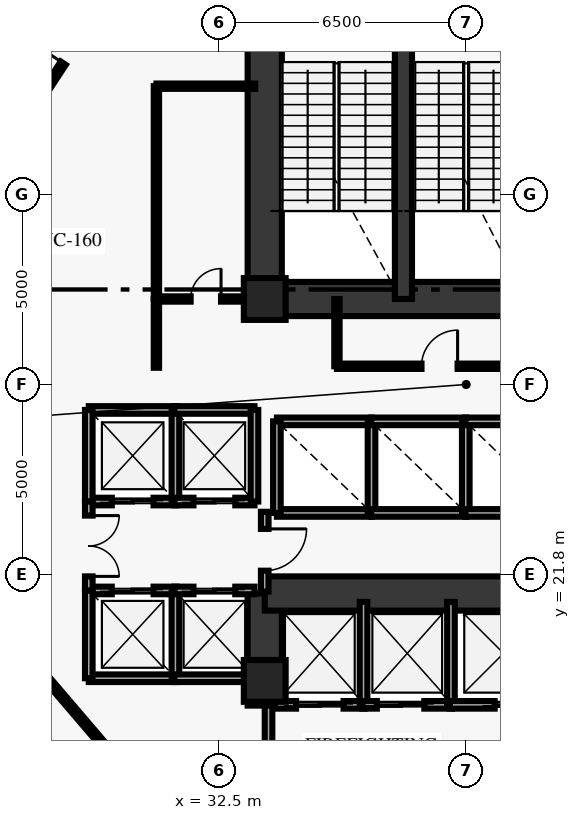
"""IFC4 building model, lengths in metres.
Left out: names, types, materials, properties, quantities, classifications, styles, units other than length and angle.
Written with IfcOpenShell. Run it as: python <this file> out.ifc"""

import sys

from ifc_helpers import new_model, si_unit, direction, frame, frame_2d, origin, origin_2d, place, context, subcontext, project, spatial, rectangle, extrude, element, fill, save


model = new_model("IFC4")
c1 = context("Model", 3, precision=1e-05, world=origin(), true_north=direction((0.0, 1.0)))
c2 = subcontext(c1, "Body", "Model", "MODEL_VIEW")
j1 = project(units=[si_unit("LENGTHUNIT", "METRE"), si_unit("PLANEANGLEUNIT", "RADIAN")], contexts=[c1])
p1 = place(None, origin())
s1 = spatial("IfcSite", under=j1, at=p1, CompositionType="ELEMENT")
p2 = place(p1, origin())
s2 = spatial("IfcBuilding", under=s1, at=p2, CompositionType="ELEMENT")
p3 = place(p2, frame((0.0, 0.0, 16.0)))
s3 = spatial("IfcBuildingStorey", under=s2, at=p3, CompositionType="ELEMENT", Elevation=16.0)
for number, where, z_axis, x_axis in (
    (1, (33.7, 19.0, 0.0), (0.0, 0.0, 1.0), (1.0, 0.0, 0.0)),
    (2, (33.7, 29.05, 0.0), (0.0, 0.0, 1.0), (1.0, 0.0, 0.0)),
):
    element("IfcColumn", number, at=place(p3, frame(where, z_axis=z_axis, x_axis=x_axis)), inside=s3, PredefinedType="PILASTER", context=c2, shape_type="SweptSolid", body=[
        extrude(rectangle(XDim=1.1, YDim=1.1, at=origin_2d()), origin(), (0.0, 0.0, 1.0), 4.74),
    ])
p4 = place(p3, frame((33.7, 29.05, 0.0), z_axis=(0.0, 0.0, 1.0), x_axis=(0.0, 1.0, 0.0)))
e3 = element("IfcWall", 3, at=p4, inside=s3, PredefinedType="SHEAR", context=c2, shape_type="SweptSolid", body=[
    extrude(rectangle(XDim=8.35, YDim=0.9, at=frame_2d((4.175, 0.0))), origin(), (0.0, 0.0, 1.0), 4.74),
])
p5 = place(p3, frame((33.7, 18.35, 0.0), z_axis=(0.0, 0.0, 1.0), x_axis=(0.0, 1.0, 0.0)))
e4 = element("IfcWall", 4, at=p5, inside=s3, PredefinedType="SHEAR", context=c2, shape_type="SweptSolid", body=[
    extrude(rectangle(XDim=2.95, YDim=0.9, at=frame_2d((1.475, 0.0))), origin(), (0.0, 0.0, 1.0), 4.74),
])
p6 = place(p3, frame((33.7, 29.05, 0.0), z_axis=(0.0, 0.0, 1.0), x_axis=(1.0, 0.0, 0.0)))
e5 = element("IfcWall", 5, at=p6, inside=s3, PredefinedType="SHEAR", context=c2, shape_type="SweptSolid", body=[
    extrude(rectangle(XDim=10.6, YDim=0.9, at=frame_2d((5.3, 0.0))), origin(), (0.0, 0.0, 1.0), 4.74),
])
p7 = place(p3, frame((33.7, 21.3, 0.0), z_axis=(0.0, 0.0, 1.0), x_axis=(1.0, 0.0, 0.0)))
e6 = element("IfcWall", 6, at=p7, inside=s3, PredefinedType="SHEAR", context=c2, shape_type="SweptSolid", body=[
    extrude(rectangle(XDim=7.55, YDim=0.9, at=frame_2d((3.775, 0.0))), origin(), (0.0, 0.0, 1.0), 4.74),
])
p8 = place(p3, frame((37.35, 29.05, 0.0), z_axis=(0.0, 0.0, 1.0), x_axis=(0.0, 1.0, 0.0)))
e7 = element("IfcWall", 7, at=p8, inside=s3, PredefinedType="SHEAR", context=c2, shape_type="SweptSolid", body=[
    extrude(rectangle(XDim=8.35, YDim=0.45, at=frame_2d((4.175, 0.0))), origin(), (0.0, 0.0, 1.0), 4.74),
])
p9 = place(p3, frame((35.6, 27.28, 0.0), z_axis=(0.0, 0.0, 1.0), x_axis=(0.0, 1.0, 0.0)))
e8 = element("IfcWall", 8, at=p9, inside=s3, PredefinedType="PARTITIONING", context=c2, shape_type="SweptSolid", body=[
    extrude(rectangle(XDim=1.77, YDim=0.14, at=frame_2d((0.885, 0.0))), origin(), (0.0, 0.0, 1.0), 4.74),
])
p10 = place(p3, frame((29.07, 23.72, 0.0), z_axis=(0.0, 0.0, 1.0), x_axis=(1.0, 0.0, 0.0)))
e9 = element("IfcWall", 9, at=p10, inside=s3, PredefinedType="SOLIDWALL", context=c2, shape_type="SweptSolid", body=[
    extrude(rectangle(XDim=2.31, YDim=0.2, at=frame_2d((1.155, 0.0))), origin(), (0.0, 0.0, 1.0), 4.74),
])
p11 = place(p10, frame((0.605, 0.0, 0.0)))
e10 = element("IfcOpeningElement", 10, at=p11, cuts=e9, PredefinedType="OPENING", context=c2, shape_type="SweptSolid", body=[
    extrude(rectangle(XDim=1.1, YDim=2.15, at=frame_2d((0.55, 1.075))), frame((0.0, 0.11, 0.0), z_axis=(0.0, -1.0, 0.0), x_axis=(1.0, 0.0, 0.0)), (0.0, 0.0, 1.0), 0.22),
])
p12 = place(p3, frame((29.07, 26.13, 0.0), z_axis=(0.0, 0.0, 1.0), x_axis=(1.0, 0.0, 0.0)))
e11 = element("IfcWall", 11, at=p12, inside=s3, PredefinedType="SOLIDWALL", context=c2, shape_type="SweptSolid", body=[
    extrude(rectangle(XDim=2.31, YDim=0.2, at=frame_2d((1.155, 0.0))), origin(), (0.0, 0.0, 1.0), 4.74),
])
for number, where, z_axis, x_axis in (
    (12, (29.07, 23.72, 0.0), (0.0, 0.0, 1.0), (0.0, 1.0, 0.0)),
    (13, (31.35, 23.72, 0.0), (0.0, 0.0, 1.0), (0.0, 1.0, 0.0)),
):
    element("IfcWall", number, at=place(p3, frame(where, z_axis=z_axis, x_axis=x_axis)), inside=s3, PredefinedType="SOLIDWALL", context=c2, shape_type="SweptSolid", body=[
        extrude(rectangle(XDim=2.41, YDim=0.2, at=frame_2d((1.205, 0.0))), origin(), (0.0, 0.0, 1.0), 4.74),
    ])
p13 = place(p3, frame((31.32, 23.72, 0.0), z_axis=(0.0, 0.0, 1.0), x_axis=(1.0, 0.0, 0.0)))
e14 = element("IfcWall", 14, at=p13, inside=s3, PredefinedType="SOLIDWALL", context=c2, shape_type="SweptSolid", body=[
    extrude(rectangle(XDim=2.11, YDim=0.2, at=frame_2d((1.055, 0.0))), origin(), (0.0, 0.0, 1.0), 4.74),
])
p14 = place(p13, frame((0.505, 0.0, 0.0)))
e15 = element("IfcOpeningElement", 15, at=p14, cuts=e14, PredefinedType="OPENING", context=c2, shape_type="SweptSolid", body=[
    extrude(rectangle(XDim=1.1, YDim=2.15, at=frame_2d((0.55, 1.075))), frame((0.0, 0.11, 0.0), z_axis=(0.0, -1.0, 0.0), x_axis=(1.0, 0.0, 0.0)), (0.0, 0.0, 1.0), 0.22),
])
p15 = place(p3, frame((31.32, 26.13, 0.0), z_axis=(0.0, 0.0, 1.0), x_axis=(1.0, 0.0, 0.0)))
e16 = element("IfcWall", 16, at=p15, inside=s3, PredefinedType="SOLIDWALL", context=c2, shape_type="SweptSolid", body=[
    extrude(rectangle(XDim=2.11, YDim=0.2, at=frame_2d((1.055, 0.0))), origin(), (0.0, 0.0, 1.0), 4.74),
])
p16 = place(p3, frame((33.43, 23.72, 0.0), z_axis=(0.0, 0.0, 1.0), x_axis=(0.0, 1.0, 0.0)))
e17 = element("IfcWall", 17, at=p16, inside=s3, PredefinedType="SOLIDWALL", context=c2, shape_type="SweptSolid", body=[
    extrude(rectangle(XDim=2.41, YDim=0.2, at=frame_2d((1.205, 0.0))), origin(), (0.0, 0.0, 1.0), 4.74),
])
p17 = place(p3, frame((29.07, 19.07, 0.0), z_axis=(0.0, 0.0, 1.0), x_axis=(1.0, 0.0, 0.0)))
e18 = element("IfcWall", 18, at=p17, inside=s3, PredefinedType="SOLIDWALL", context=c2, shape_type="SweptSolid", body=[
    extrude(rectangle(XDim=2.31, YDim=0.2, at=frame_2d((1.155, 0.0))), origin(), (0.0, 0.0, 1.0), 4.74),
])
p18 = place(p3, frame((29.07, 21.38, 0.0), z_axis=(0.0, 0.0, 1.0), x_axis=(1.0, 0.0, 0.0)))
e19 = element("IfcWall", 19, at=p18, inside=s3, PredefinedType="SOLIDWALL", context=c2, shape_type="SweptSolid", body=[
    extrude(rectangle(XDim=2.31, YDim=0.2, at=frame_2d((1.155, 0.0))), origin(), (0.0, 0.0, 1.0), 4.74),
])
p19 = place(p18, frame((0.605, 0.0, 0.0)))
e20 = element("IfcOpeningElement", 20, at=p19, cuts=e19, PredefinedType="OPENING", context=c2, shape_type="SweptSolid", body=[
    extrude(rectangle(XDim=1.1, YDim=2.15, at=frame_2d((0.55, 1.075))), frame((0.0, 0.11, 0.0), z_axis=(0.0, -1.0, 0.0), x_axis=(1.0, 0.0, 0.0)), (0.0, 0.0, 1.0), 0.22),
])
for number, where, z_axis, x_axis in (
    (21, (29.07, 19.07, 0.0), (0.0, 0.0, 1.0), (0.0, 1.0, 0.0)),
    (22, (31.35, 19.07, 0.0), (0.0, 0.0, 1.0), (0.0, 1.0, 0.0)),
):
    element("IfcWall", number, at=place(p3, frame(where, z_axis=z_axis, x_axis=x_axis)), inside=s3, PredefinedType="SOLIDWALL", context=c2, shape_type="SweptSolid", body=[
        extrude(rectangle(XDim=2.31, YDim=0.2, at=frame_2d((1.155, 0.0))), origin(), (0.0, 0.0, 1.0), 4.74),
    ])
p20 = place(p3, frame((31.32, 19.07, 0.0), z_axis=(0.0, 0.0, 1.0), x_axis=(1.0, 0.0, 0.0)))
e23 = element("IfcWall", 23, at=p20, inside=s3, PredefinedType="SOLIDWALL", context=c2, shape_type="SweptSolid", body=[
    extrude(rectangle(XDim=2.11, YDim=0.2, at=frame_2d((1.055, 0.0))), origin(), (0.0, 0.0, 1.0), 4.74),
])
p21 = place(p3, frame((31.32, 21.38, 0.0), z_axis=(0.0, 0.0, 1.0), x_axis=(1.0, 0.0, 0.0)))
e24 = element("IfcWall", 24, at=p21, inside=s3, PredefinedType="SOLIDWALL", context=c2, shape_type="SweptSolid", body=[
    extrude(rectangle(XDim=2.11, YDim=0.2, at=frame_2d((1.055, 0.0))), origin(), (0.0, 0.0, 1.0), 4.74),
])
p22 = place(p21, frame((0.505, 0.0, 0.0)))
e25 = element("IfcOpeningElement", 25, at=p22, cuts=e24, PredefinedType="OPENING", context=c2, shape_type="SweptSolid", body=[
    extrude(rectangle(XDim=1.1, YDim=2.15, at=frame_2d((0.55, 1.075))), frame((0.0, 0.11, 0.0), z_axis=(0.0, -1.0, 0.0), x_axis=(1.0, 0.0, 0.0)), (0.0, 0.0, 1.0), 0.22),
])
for number, where, z_axis, x_axis in (
    (26, (34.02, 23.42, 0.0), (0.0, 0.0, 1.0), (1.0, 0.0, 0.0)),
    (27, (34.02, 25.83, 0.0), (0.0, 0.0, 1.0), (1.0, 0.0, 0.0)),
):
    element("IfcWall", number, at=place(p3, frame(where, z_axis=z_axis, x_axis=x_axis)), inside=s3, PredefinedType="SOLIDWALL", context=c2, shape_type="SweptSolid", body=[
        extrude(rectangle(XDim=2.5, YDim=0.2, at=frame_2d((1.25, 0.0))), origin(), (0.0, 0.0, 1.0), 4.74),
    ])
for number, where, z_axis, x_axis in (
    (28, (34.02, 23.42, 0.0), (0.0, 0.0, 1.0), (0.0, 1.0, 0.0)),
    (29, (36.51, 23.42, 0.0), (0.0, 0.0, 1.0), (0.0, 1.0, 0.0)),
):
    element("IfcWall", number, at=place(p3, frame(where, z_axis=z_axis, x_axis=x_axis)), inside=s3, PredefinedType="SOLIDWALL", context=c2, shape_type="SweptSolid", body=[
        extrude(rectangle(XDim=2.41, YDim=0.2, at=frame_2d((1.205, 0.0))), origin(), (0.0, 0.0, 1.0), 4.74),
    ])
for number, where, z_axis, x_axis in (
    (30, (36.5, 23.42, 0.0), (0.0, 0.0, 1.0), (1.0, 0.0, 0.0)),
    (31, (36.5, 25.83, 0.0), (0.0, 0.0, 1.0), (1.0, 0.0, 0.0)),
):
    element("IfcWall", number, at=place(p3, frame(where, z_axis=z_axis, x_axis=x_axis)), inside=s3, PredefinedType="SOLIDWALL", context=c2, shape_type="SweptSolid", body=[
        extrude(rectangle(XDim=2.5, YDim=0.2, at=frame_2d((1.25, 0.0))), origin(), (0.0, 0.0, 1.0), 4.74),
    ])
p23 = place(p3, frame((38.99, 23.42, 0.0), z_axis=(0.0, 0.0, 1.0), x_axis=(0.0, 1.0, 0.0)))
e32 = element("IfcWall", 32, at=p23, inside=s3, PredefinedType="SOLIDWALL", context=c2, shape_type="SweptSolid", body=[
    extrude(rectangle(XDim=2.41, YDim=0.2, at=frame_2d((1.205, 0.0))), origin(), (0.0, 0.0, 1.0), 4.74),
])
for number, where, z_axis, x_axis in (
    (33, (38.98, 23.42, 0.0), (0.0, 0.0, 1.0), (1.0, 0.0, 0.0)),
    (34, (38.98, 25.83, 0.0), (0.0, 0.0, 1.0), (1.0, 0.0, 0.0)),
):
    element("IfcWall", number, at=place(p3, frame(where, z_axis=z_axis, x_axis=x_axis)), inside=s3, PredefinedType="SOLIDWALL", context=c2, shape_type="SweptSolid", body=[
        extrude(rectangle(XDim=2.5, YDim=0.2, at=frame_2d((1.25, 0.0))), origin(), (0.0, 0.0, 1.0), 4.74),
    ])
p24 = place(p3, frame((33.97, 18.37, 0.0), z_axis=(0.0, 0.0, 1.0), x_axis=(1.0, 0.0, 0.0)))
e35 = element("IfcWall", 35, at=p24, inside=s3, PredefinedType="SOLIDWALL", context=c2, shape_type="SweptSolid", body=[
    extrude(rectangle(XDim=2.36, YDim=0.2, at=frame_2d((1.18, 0.0))), origin(), (0.0, 0.0, 1.0), 4.74),
])
p25 = place(p24, frame((0.555, 0.0, 0.0)))
e36 = element("IfcOpeningElement", 36, at=p25, cuts=e35, PredefinedType="OPENING", context=c2, shape_type="SweptSolid", body=[
    extrude(rectangle(XDim=1.25, YDim=2.2, at=frame_2d((0.625, 1.1))), frame((0.0, 0.11, 0.0), z_axis=(0.0, -1.0, 0.0), x_axis=(1.0, 0.0, 0.0)), (0.0, 0.0, 1.0), 0.22),
])
p26 = place(p3, frame((36.3, 18.37, 0.0), z_axis=(0.0, 0.0, 1.0), x_axis=(0.0, 1.0, 0.0)))
e37 = element("IfcWall", 37, at=p26, inside=s3, PredefinedType="SOLIDWALL", context=c2, shape_type="SweptSolid", body=[
    extrude(rectangle(XDim=2.71, YDim=0.2, at=frame_2d((1.355, 0.0))), origin(), (0.0, 0.0, 1.0), 4.74),
])
p27 = place(p3, frame((36.27, 18.37, 0.0), z_axis=(0.0, 0.0, 1.0), x_axis=(1.0, 0.0, 0.0)))
e38 = element("IfcWall", 38, at=p27, inside=s3, PredefinedType="SOLIDWALL", context=c2, shape_type="SweptSolid", body=[
    extrude(rectangle(XDim=2.36, YDim=0.2, at=frame_2d((1.18, 0.0))), origin(), (0.0, 0.0, 1.0), 4.74),
])
p28 = place(p27, frame((0.38, 0.0, 0.0)))
e39 = element("IfcOpeningElement", 39, at=p28, cuts=e38, PredefinedType="OPENING", context=c2, shape_type="SweptSolid", body=[
    extrude(rectangle(XDim=1.25, YDim=2.2, at=frame_2d((0.625, 1.1))), frame((0.0, 0.11, 0.0), z_axis=(0.0, -1.0, 0.0), x_axis=(1.0, 0.0, 0.0)), (0.0, 0.0, 1.0), 0.22),
])
p29 = place(p3, frame((38.6, 18.37, 0.0), z_axis=(0.0, 0.0, 1.0), x_axis=(0.0, 1.0, 0.0)))
e40 = element("IfcWall", 40, at=p29, inside=s3, PredefinedType="SOLIDWALL", context=c2, shape_type="SweptSolid", body=[
    extrude(rectangle(XDim=2.71, YDim=0.2, at=frame_2d((1.355, 0.0))), origin(), (0.0, 0.0, 1.0), 4.74),
])
p30 = place(p3, frame((38.57, 18.37, 0.0), z_axis=(0.0, 0.0, 1.0), x_axis=(1.0, 0.0, 0.0)))
e41 = element("IfcWall", 41, at=p30, inside=s3, PredefinedType="SOLIDWALL", context=c2, shape_type="SweptSolid", body=[
    extrude(rectangle(XDim=2.83, YDim=0.2, at=frame_2d((1.415, 0.0))), origin(), (0.0, 0.0, 1.0), 4.74),
])
p31 = place(p30, frame((1.18, 0.0, 0.0)))
e42 = element("IfcOpeningElement", 42, at=p31, cuts=e41, PredefinedType="OPENING", context=c2, shape_type="SweptSolid", body=[
    extrude(rectangle(XDim=1.35, YDim=2.18, at=frame_2d((0.675, 1.09))), frame((0.0, 0.11, 0.0), z_axis=(0.0, -1.0, 0.0), x_axis=(1.0, 0.0, 0.0)), (0.0, 0.0, 1.0), 0.22),
])
p32 = place(p3, frame((29.07, 21.38, 0.0), z_axis=(0.0, 0.0, 1.0), x_axis=(0.0, 1.0, 0.0)))
e43 = element("IfcWall", 43, at=p32, inside=s3, PredefinedType="SOLIDWALL", context=c2, shape_type="SweptSolid", body=[
    extrude(rectangle(XDim=2.34, YDim=0.2, at=frame_2d((1.17, 0.0))), origin(), (0.0, 0.0, 1.0), 4.74),
])
p33 = place(p32, frame((0.37, 0.0, 0.0)))
e44 = element("IfcOpeningElement", 44, at=p33, cuts=e43, PredefinedType="OPENING", context=c2, shape_type="SweptSolid", body=[
    extrude(rectangle(XDim=1.6, YDim=2.2, at=frame_2d((0.8, 1.1))), frame((0.0, 0.11, 0.0), z_axis=(0.0, -1.0, 0.0), x_axis=(1.0, 0.0, 0.0)), (0.0, 0.0, 1.0), 0.22),
])
p34 = place(p3, frame((33.7, 21.35, 0.0), z_axis=(0.0, 0.0, 1.0), x_axis=(0.0, 1.0, 0.0)))
e45 = element("IfcWall", 45, at=p34, inside=s3, PredefinedType="SOLIDWALL", context=c2, shape_type="SweptSolid", body=[
    extrude(rectangle(XDim=2.1, YDim=0.2, at=frame_2d((1.05, 0.0))), origin(), (0.0, 0.0, 1.0), 3.96),
])
p35 = place(p34, frame((0.55, 0.0, 0.0)))
e46 = element("IfcOpeningElement", 46, at=p35, cuts=e45, PredefinedType="OPENING", context=c2, shape_type="SweptSolid", body=[
    extrude(rectangle(XDim=1.1, YDim=2.15, at=frame_2d((0.55, 1.075))), frame((0.0, 0.11, 0.0), z_axis=(0.0, -1.0, 0.0), x_axis=(1.0, 0.0, 0.0)), (0.0, 0.0, 1.0), 0.22),
])
p36 = place(p3, frame((33.8, 15.55, 0.0), z_axis=(0.0, 0.0, 1.0), x_axis=(0.0, 1.0, 0.0)))
e47 = element("IfcWall", 47, at=p36, inside=s3, PredefinedType="SOLIDWALL", context=c2, shape_type="SweptSolid", body=[
    extrude(rectangle(XDim=2.8, YDim=0.2, at=frame_2d((1.4, 0.0))), origin(), (0.0, 0.0, 1.0), 4.74),
])
p37 = place(p3, frame((35.6, 27.28, 0.0), z_axis=(0.0, 0.0, 1.0), x_axis=(1.0, 0.0, 0.0)))
e48 = element("IfcWall", 48, at=p37, inside=s3, PredefinedType="PARTITIONING", context=c2, shape_type="SweptSolid", body=[
    extrude(rectangle(XDim=5.4, YDim=0.14, at=frame_2d((2.7, 0.0))), origin(), (0.0, 0.0, 1.0), 4.74),
])
p38 = place(p37, frame((2.225, 0.0, 0.0)))
e49 = element("IfcOpeningElement", 49, at=p38, cuts=e48, PredefinedType="OPENING", context=c2, shape_type="SweptSolid", body=[
    extrude(rectangle(XDim=0.95, YDim=2.1, at=frame_2d((0.475, 1.05))), frame((0.0, 0.08, 0.0), z_axis=(0.0, -1.0, 0.0), x_axis=(1.0, 0.0, 0.0)), (0.0, 0.0, 1.0), 0.16),
])
p39 = place(p3, frame((30.85, 27.24, 0.0), z_axis=(0.0, 0.0, 1.0), x_axis=(0.0, 1.0, 0.0)))
e50 = element("IfcWall", 50, at=p39, inside=s3, PredefinedType="PARTITIONING", context=c2, shape_type="SweptSolid", body=[
    extrude(rectangle(XDim=1.81, YDim=0.14, at=frame_2d((0.905, 0.0))), origin(), (0.0, 0.0, 1.0), 4.74),
])
p40 = place(p3, frame((30.85, 29.05, 0.0), z_axis=(0.0, 0.0, 1.0), x_axis=(1.0, 0.0, 0.0)))
e51 = element("IfcWall", 51, at=p40, inside=s3, PredefinedType="PARTITIONING", context=c2, shape_type="SweptSolid", body=[
    extrude(rectangle(XDim=2.6, YDim=0.14, at=frame_2d((1.3, 0.0))), origin(), (0.0, 0.0, 1.0), 2.74),
])
p41 = place(p40, frame((0.9, 0.0, 0.0)))
e52 = element("IfcOpeningElement", 52, at=p41, cuts=e51, PredefinedType="OPENING", context=c2, shape_type="SweptSolid", body=[
    extrude(rectangle(XDim=0.8, YDim=2.05, at=frame_2d((0.4, 1.025))), frame((0.0, 0.08, 0.0), z_axis=(0.0, -1.0, 0.0), x_axis=(1.0, 0.0, 0.0)), (0.0, 0.0, 1.0), 0.16),
])
p42 = place(p3, frame((30.85, 34.65, 0.0), z_axis=(0.0, 0.0, 1.0), x_axis=(1.0, 0.0, 0.0)))
e53 = element("IfcWall", 53, at=p42, inside=s3, PredefinedType="PARTITIONING", context=c2, shape_type="SweptSolid", body=[
    extrude(rectangle(XDim=2.6, YDim=0.14, at=frame_2d((1.3, 0.0))), origin(), (0.0, 0.0, 1.0), 4.74),
])
p43 = place(p3, frame((30.85, 29.05, 0.0), z_axis=(0.0, 0.0, 1.0), x_axis=(0.0, 1.0, 0.0)))
e54 = element("IfcWall", 54, at=p43, inside=s3, PredefinedType="PARTITIONING", context=c2, shape_type="SweptSolid", body=[
    extrude(rectangle(XDim=5.6, YDim=0.14, at=frame_2d((2.8, 0.0))), origin(), (0.0, 0.0, 1.0), 4.74),
])
p44 = place(p3, frame((27.811, 34.36, 0.0), z_axis=(0.0, 0.0, 1.0), x_axis=(0.548348738977, 0.836249759619, 0.0)))
e55 = element("IfcWall", 55, at=p44, inside=s3, PredefinedType="PARTITIONING", context=c2, shape_type="SweptSolid", body=[
    extrude(rectangle(XDim=3.744, YDim=0.16, at=frame_2d((1.872, 0.0))), origin(), (0.0, 0.0, 1.0), 4.74),
])
p45 = place(p44, frame((1.072, 0.0, 0.0)))
e56 = element("IfcOpeningElement", 56, at=p45, cuts=e55, PredefinedType="OPENING", context=c2, shape_type="SweptSolid", body=[
    extrude(rectangle(XDim=1.6, YDim=2.2, at=frame_2d((0.8, 1.1))), frame((0.0, 0.09, 0.0), z_axis=(0.0, -1.0, 0.0), x_axis=(1.0, 0.0, 0.0)), (0.0, 0.0, 1.0), 0.18),
])
p46 = place(p3, frame((27.811, 19.24, 0.0), z_axis=(0.0, 0.0, 1.0), x_axis=(0.649652680018, -0.760231145998, 0.0)))
e57 = element("IfcWall", 57, at=p46, inside=s3, PredefinedType="PARTITIONING", context=c2, shape_type="SweptSolid", body=[
    extrude(rectangle(XDim=7.279, YDim=0.16, at=frame_2d((3.64, 0.0))), origin(), (0.0, 0.0, 1.0), 4.74),
])
p47 = place(p11, origin())
e58 = element("IfcDoor", 58, at=p47, inside=s3, OperationType="DOUBLE_DOOR_SLIDING", PredefinedType="DOOR", context=c2, shape_type="SweptSolid", body=[
    extrude(rectangle(XDim=1.1, YDim=2.15, at=frame_2d((0.55, 1.075))), frame((0.0, 0.025, 0.0), z_axis=(0.0, -1.0, 0.0), x_axis=(1.0, 0.0, 0.0)), (0.0, 0.0, 1.0), 0.05),
])
fill(e10, e58)
p48 = place(p14, origin())
e59 = element("IfcDoor", 59, at=p48, inside=s3, OperationType="DOUBLE_DOOR_SLIDING", PredefinedType="DOOR", context=c2, shape_type="SweptSolid", body=[
    extrude(rectangle(XDim=1.1, YDim=2.15, at=frame_2d((0.55, 1.075))), frame((0.0, 0.025, 0.0), z_axis=(0.0, -1.0, 0.0), x_axis=(1.0, 0.0, 0.0)), (0.0, 0.0, 1.0), 0.05),
])
fill(e15, e59)
p49 = place(p19, origin())
e60 = element("IfcDoor", 60, at=p49, inside=s3, OperationType="DOUBLE_DOOR_SLIDING", PredefinedType="DOOR", context=c2, shape_type="SweptSolid", body=[
    extrude(rectangle(XDim=1.1, YDim=2.15, at=frame_2d((0.55, 1.075))), frame((0.0, 0.025, 0.0), z_axis=(0.0, -1.0, 0.0), x_axis=(1.0, 0.0, 0.0)), (0.0, 0.0, 1.0), 0.05),
])
fill(e20, e60)
p50 = place(p22, origin())
e61 = element("IfcDoor", 61, at=p50, inside=s3, OperationType="DOUBLE_DOOR_SLIDING", PredefinedType="DOOR", context=c2, shape_type="SweptSolid", body=[
    extrude(rectangle(XDim=1.1, YDim=2.15, at=frame_2d((0.55, 1.075))), frame((0.0, 0.025, 0.0), z_axis=(0.0, -1.0, 0.0), x_axis=(1.0, 0.0, 0.0)), (0.0, 0.0, 1.0), 0.05),
])
fill(e25, e61)
p51 = place(p25, origin())
e62 = element("IfcDoor", 62, at=p51, inside=s3, OperationType="DOUBLE_DOOR_SLIDING", PredefinedType="DOOR", context=c2, shape_type="SweptSolid", body=[
    extrude(rectangle(XDim=1.25, YDim=2.2, at=frame_2d((0.625, 1.1))), frame((0.0, 0.025, 0.0), z_axis=(0.0, -1.0, 0.0), x_axis=(1.0, 0.0, 0.0)), (0.0, 0.0, 1.0), 0.05),
])
fill(e36, e62)
p52 = place(p28, origin())
e63 = element("IfcDoor", 63, at=p52, inside=s3, OperationType="DOUBLE_DOOR_SLIDING", PredefinedType="DOOR", context=c2, shape_type="SweptSolid", body=[
    extrude(rectangle(XDim=1.25, YDim=2.2, at=frame_2d((0.625, 1.1))), frame((0.0, 0.025, 0.0), z_axis=(0.0, -1.0, 0.0), x_axis=(1.0, 0.0, 0.0)), (0.0, 0.0, 1.0), 0.05),
])
fill(e39, e63)
p53 = place(p31, origin())
e64 = element("IfcDoor", 64, at=p53, inside=s3, OperationType="DOUBLE_DOOR_SLIDING", PredefinedType="DOOR", context=c2, shape_type="SweptSolid", body=[
    extrude(rectangle(XDim=1.35, YDim=2.18, at=frame_2d((0.675, 1.09))), frame((0.0, 0.025, 0.0), z_axis=(0.0, -1.0, 0.0), x_axis=(1.0, 0.0, 0.0)), (0.0, 0.0, 1.0), 0.05),
])
fill(e42, e64)
p54 = place(p33, origin())
e65 = element("IfcDoor", 65, at=p54, inside=s3, OperationType="DOUBLE_DOOR_SINGLE_SWING", PredefinedType="DOOR", context=c2, shape_type="SweptSolid", body=[
    extrude(rectangle(XDim=1.6, YDim=2.2, at=frame_2d((0.8, 1.1))), frame((0.0, 0.025, 0.0), z_axis=(0.0, -1.0, 0.0), x_axis=(1.0, 0.0, 0.0)), (0.0, 0.0, 1.0), 0.05),
])
fill(e44, e65)
p55 = place(p35, origin())
e66 = element("IfcDoor", 66, at=p55, inside=s3, OperationType="SINGLE_SWING_RIGHT", PredefinedType="DOOR", context=c2, shape_type="SweptSolid", body=[
    extrude(rectangle(XDim=1.1, YDim=2.15, at=frame_2d((0.55, 1.075))), frame((0.0, 0.025, 0.0), z_axis=(0.0, -1.0, 0.0), x_axis=(1.0, 0.0, 0.0)), (0.0, 0.0, 1.0), 0.05),
])
fill(e46, e66)
p56 = place(p38, origin())
e67 = element("IfcDoor", 67, at=p56, inside=s3, OperationType="SINGLE_SWING_RIGHT", PredefinedType="DOOR", context=c2, shape_type="SweptSolid", body=[
    extrude(rectangle(XDim=0.95, YDim=2.1, at=frame_2d((0.475, 1.05))), frame((0.0, 0.025, 0.0), z_axis=(0.0, -1.0, 0.0), x_axis=(1.0, 0.0, 0.0)), (0.0, 0.0, 1.0), 0.05),
])
fill(e49, e67)
p57 = place(p41, origin())
e68 = element("IfcDoor", 68, at=p57, inside=s3, OperationType="SINGLE_SWING_RIGHT", PredefinedType="DOOR", context=c2, shape_type="SweptSolid", body=[
    extrude(rectangle(XDim=0.8, YDim=2.05, at=frame_2d((0.4, 1.025))), frame((0.0, 0.025, 0.0), z_axis=(0.0, -1.0, 0.0), x_axis=(1.0, 0.0, 0.0)), (0.0, 0.0, 1.0), 0.05),
])
fill(e52, e68)
p58 = place(p45, origin())
e69 = element("IfcDoor", 69, at=p58, inside=s3, OperationType="DOUBLE_DOOR_SINGLE_SWING", PredefinedType="DOOR", context=c2, shape_type="SweptSolid", body=[
    extrude(rectangle(XDim=1.6, YDim=2.2, at=frame_2d((0.8, 1.1))), frame((0.0, 0.025, 0.0), z_axis=(0.0, -1.0, 0.0), x_axis=(1.0, 0.0, 0.0)), (0.0, 0.0, 1.0), 0.05),
])
fill(e56, e69)
save(model, sys.argv[1])
